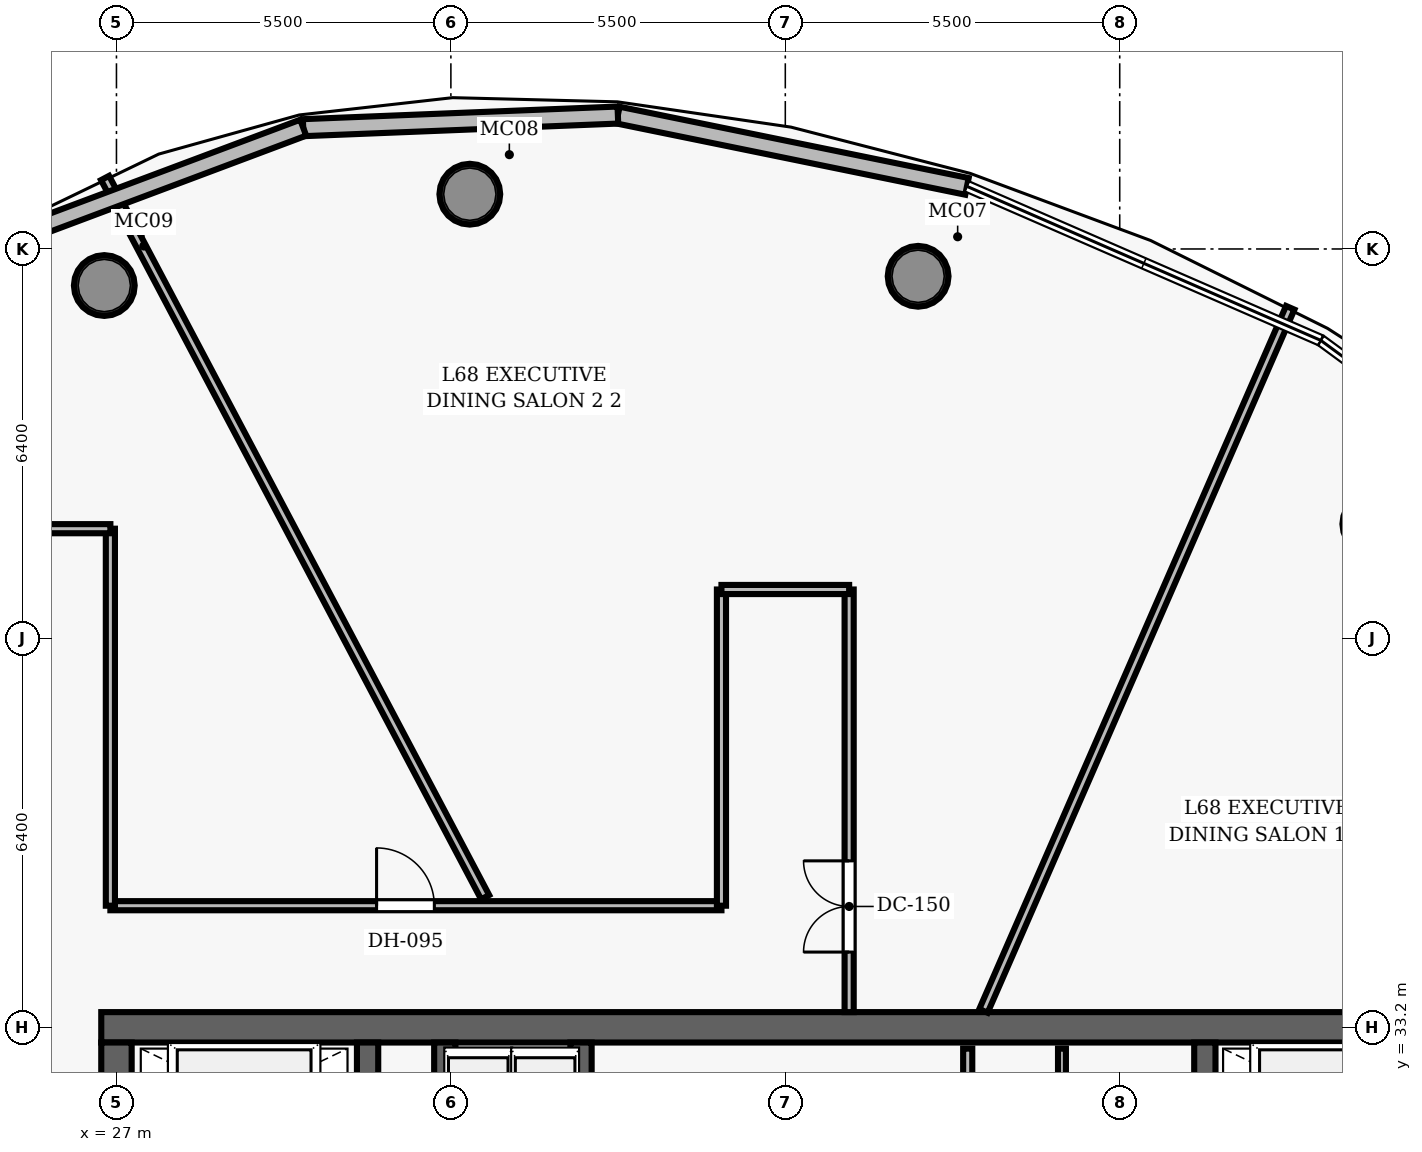
"""IFC4 building model, lengths in metres.
Left out: names, types, materials, properties, quantities, classifications, styles, units other than length and angle.
Written with IfcOpenShell. Run it as: python <this file> out.ifc"""

import sys

from ifc_helpers import new_model, si_unit, direction, frame, frame_2d, origin, origin_2d, place, context, subcontext, project, spatial, rectangle, hollow_circle, extrude, element, fill, save


model = new_model("IFC4")
c1 = context("Model", 3, precision=1e-05, world=origin(), true_north=direction((0.0, 1.0)))
c2 = subcontext(c1, "Body", "Model", "MODEL_VIEW")
j1 = project(units=[si_unit("LENGTHUNIT", "METRE"), si_unit("PLANEANGLEUNIT", "RADIAN")], contexts=[c1])
p1 = place(None, origin())
s1 = spatial("IfcSite", under=j1, at=p1, CompositionType="ELEMENT")
p2 = place(p1, origin())
s2 = spatial("IfcBuilding", under=s1, at=p2, CompositionType="ELEMENT")
p3 = place(p2, frame((0.0, 0.0, 269.0)))
s3 = spatial("IfcBuildingStorey", under=s2, at=p3, CompositionType="ELEMENT", Elevation=269.0)
p4 = place(p3, frame((26.75, 33.2, 0.0), z_axis=(0.0, 0.0, 1.0), x_axis=(1.0, 0.0, 0.0)))
e1 = element("IfcWall", 1, at=p4, inside=s3, PredefinedType="SHEAR", context=c2, shape_type="SweptSolid", body=[
    extrude(rectangle(XDim=22.5, YDim=0.5, at=frame_2d((11.25, 0.0))), origin(), (0.0, 0.0, 1.0), 3.85),
])
p5 = place(p3, frame((27.0, 19.05, 0.0), z_axis=(0.0, 0.0, 1.0), x_axis=(0.0, 1.0, 0.0)))
e2 = element("IfcWall", 2, at=p5, inside=s3, PredefinedType="SHEAR", context=c2, shape_type="SweptSolid", body=[
    extrude(rectangle(XDim=13.9, YDim=0.5, at=frame_2d((6.95, 0.0))), origin(), (0.0, 0.0, 1.0), 3.85),
])
p6 = place(p5, frame((8.2, 0.0, 0.0)))
e3 = element("IfcOpeningElement", 3, at=p6, cuts=e2, PredefinedType="OPENING", context=c2, shape_type="SweptSolid", body=[
    extrude(rectangle(XDim=1.05, YDim=2.15, at=frame_2d((0.525, 1.075))), frame((0.0, 0.26, 0.0), z_axis=(0.0, -1.0, 0.0), x_axis=(1.0, 0.0, 0.0)), (0.0, 0.0, 1.0), 0.52),
])
for number, where, z_axis, x_axis in (
    (4, (31.13, 19.05, 0.0), (0.0, 0.0, 1.0), (0.0, 1.0, 0.0)),
    (5, (44.9, 19.05, 0.0), (0.0, 0.0, 1.0), (0.0, 1.0, 0.0)),
):
    element("IfcWall", number, at=place(p3, frame(where, z_axis=z_axis, x_axis=x_axis)), inside=s3, PredefinedType="SHEAR", context=c2, shape_type="SweptSolid", body=[
        extrude(rectangle(XDim=13.9, YDim=0.35, at=frame_2d((6.95, 0.0))), origin(), (0.0, 0.0, 1.0), 3.85),
    ])
for number, where, z_axis, x_axis in (
    (6, (47.662, 41.477, 0.0), (0.0, 0.0, 1.0), (1.0, 0.0, 0.0)),
    (7, (40.185, 45.551, 0.0), (0.0, 0.0, 1.0), (1.0, 0.0, 0.0)),
    (8, (32.812, 46.901, 0.0), (0.0, 0.0, 1.0), (1.0, 0.0, 0.0)),
    (9, (26.8, 45.399, 0.0), (0.0, 0.0, 1.0), (1.0, 0.0, 0.0)),
):
    element("IfcColumn", number, at=place(p3, frame(where, z_axis=z_axis, x_axis=x_axis)), inside=s3, PredefinedType="COLUMN", context=c2, shape_type="SweptSolid", body=[
        extrude(hollow_circle(Radius=0.5, WallThickness=0.045, at=origin_2d()), origin(), (0.0, 0.0, 1.0), 3.85),
    ])
p7 = place(p3, frame((34.64, 26.69, 0.0), z_axis=(0.0, 0.0, 1.0), x_axis=(0.0, 1.0, 0.0)))
e10 = element("IfcWall", 10, at=p7, inside=s3, PredefinedType="SHEAR", context=c2, shape_type="SweptSolid", body=[
    extrude(rectangle(XDim=6.26, YDim=0.35, at=frame_2d((3.13, 0.0))), origin(), (0.0, 0.0, 1.0), 3.85),
])
p8 = place(p7, frame((0.85, 0.0, 0.0)))
e11 = element("IfcOpeningElement", 11, at=p8, cuts=e10, PredefinedType="OPENING", context=c2, shape_type="SweptSolid", body=[
    extrude(rectangle(XDim=1.05, YDim=2.15, at=frame_2d((0.525, 1.075))), frame((0.0, 0.185, 0.0), z_axis=(0.0, -1.0, 0.0), x_axis=(1.0, 0.0, 0.0)), (0.0, 0.0, 1.0), 0.37),
])
p9 = place(p3, frame((32.4, 30.22, 0.0), z_axis=(0.0, 0.0, 1.0), x_axis=(0.0, 1.0, 0.0)))
e12 = element("IfcWall", 12, at=p9, inside=s3, PredefinedType="SHEAR", context=c2, shape_type="SweptSolid", body=[
    extrude(rectangle(XDim=2.73, YDim=0.35, at=frame_2d((1.365, 0.0))), origin(), (0.0, 0.0, 1.0), 3.04),
])
p10 = place(p3, frame((41.0, 28.95, 0.0), z_axis=(0.0, 0.0, 1.0), x_axis=(0.0, 1.0, 0.0)))
e13 = element("IfcWall", 13, at=p10, inside=s3, PredefinedType="PARTITIONING", context=c2, shape_type="SweptSolid", body=[
    extrude(rectangle(XDim=3.9, YDim=0.15, at=frame_2d((1.95, 0.0))), origin(), (0.0, 0.0, 1.0), 3.04),
])
p11 = place(p10, frame((0.7, 0.0, 0.0)))
e14 = element("IfcOpeningElement", 14, at=p11, cuts=e13, PredefinedType="OPENING", context=c2, shape_type="SweptSolid", body=[
    extrude(rectangle(XDim=0.85, YDim=2.1, at=frame_2d((0.425, 1.05))), frame((0.0, 0.085, 0.0), z_axis=(0.0, -1.0, 0.0), x_axis=(1.0, 0.0, 0.0)), (0.0, 0.0, 1.0), 0.17),
])
p12 = place(p3, frame((42.55, 28.1, 0.0), z_axis=(0.0, 0.0, 1.0), x_axis=(0.0, 1.0, 0.0)))
e15 = element("IfcWall", 15, at=p12, inside=s3, PredefinedType="PARTITIONING", context=c2, shape_type="SweptSolid", body=[
    extrude(rectangle(XDim=4.75, YDim=0.13, at=frame_2d((2.375, 0.0))), origin(), (0.0, 0.0, 1.0), 3.04),
])
p13 = place(p12, frame((0.55, 0.0, 0.0)))
e16 = element("IfcOpeningElement", 16, at=p13, cuts=e15, PredefinedType="OPENING", context=c2, shape_type="SweptSolid", body=[
    extrude(rectangle(XDim=0.85, YDim=2.1, at=frame_2d((0.425, 1.05))), frame((0.0, 0.075, 0.0), z_axis=(0.0, -1.0, 0.0), x_axis=(1.0, 0.0, 0.0)), (0.0, 0.0, 1.0), 0.15),
])
p14 = place(p12, frame((2.9, 0.0, 0.0)))
e17 = element("IfcOpeningElement", 17, at=p14, cuts=e15, PredefinedType="OPENING", context=c2, shape_type="SweptSolid", body=[
    extrude(rectangle(XDim=0.85, YDim=2.1, at=frame_2d((0.425, 1.05))), frame((0.0, 0.075, 0.0), z_axis=(0.0, -1.0, 0.0), x_axis=(1.0, 0.0, 0.0)), (0.0, 0.0, 1.0), 0.15),
])
p15 = place(p3, frame((26.9, 35.2, 0.0), z_axis=(0.0, 0.0, 1.0), x_axis=(1.0, 0.0, 0.0)))
e18 = element("IfcWall", 18, at=p15, inside=s3, PredefinedType="PARTITIONING", context=c2, shape_type="SweptSolid", body=[
    extrude(rectangle(XDim=10.05, YDim=0.15, at=frame_2d((5.025, 0.0))), origin(), (0.0, 0.0, 1.0), 3.04),
])
p16 = place(p15, frame((4.378, 0.0, 0.0)))
e19 = element("IfcOpeningElement", 19, at=p16, cuts=e18, PredefinedType="OPENING", context=c2, shape_type="SweptSolid", body=[
    extrude(rectangle(XDim=0.95, YDim=2.15, at=frame_2d((0.475, 1.075))), frame((0.0, 0.085, 0.0), z_axis=(0.0, -1.0, 0.0), x_axis=(1.0, 0.0, 0.0)), (0.0, 0.0, 1.0), 0.17),
])
p17 = place(p3, frame((26.9, 35.2, 0.0), z_axis=(0.0, 0.0, 1.0), x_axis=(0.0, 1.0, 0.0)))
e20 = element("IfcWall", 20, at=p17, inside=s3, PredefinedType="PARTITIONING", context=c2, shape_type="SweptSolid", body=[
    extrude(rectangle(XDim=6.2, YDim=0.15, at=frame_2d((3.1, 0.0))), origin(), (0.0, 0.0, 1.0), 3.04),
])
p18 = place(p3, frame((24.8, 41.4, 0.0), z_axis=(0.0, 0.0, 1.0), x_axis=(1.0, 0.0, 0.0)))
e21 = element("IfcWall", 21, at=p18, inside=s3, PredefinedType="PARTITIONING", context=c2, shape_type="SweptSolid", body=[
    extrude(rectangle(XDim=2.1, YDim=0.15, at=frame_2d((1.05, 0.0))), origin(), (0.0, 0.0, 1.0), 3.04),
])
p19 = place(p3, frame((36.95, 35.2, 0.0), z_axis=(0.0, 0.0, 1.0), x_axis=(0.0, 1.0, 0.0)))
e22 = element("IfcWall", 22, at=p19, inside=s3, PredefinedType="PARTITIONING", context=c2, shape_type="SweptSolid", body=[
    extrude(rectangle(XDim=5.2, YDim=0.15, at=frame_2d((2.6, 0.0))), origin(), (0.0, 0.0, 1.0), 3.04),
])
p20 = place(p3, frame((39.05, 33.45, 0.0), z_axis=(0.0, 0.0, 1.0), x_axis=(0.0, 1.0, 0.0)))
e23 = element("IfcWall", 23, at=p20, inside=s3, PredefinedType="PARTITIONING", context=c2, shape_type="SweptSolid", body=[
    extrude(rectangle(XDim=6.95, YDim=0.15, at=frame_2d((3.475, 0.0))), origin(), (0.0, 0.0, 1.0), 3.04),
])
p21 = place(p20, frame((0.988, 0.0, 0.0)))
e24 = element("IfcOpeningElement", 24, at=p21, cuts=e23, PredefinedType="OPENING", context=c2, shape_type="SweptSolid", body=[
    extrude(rectangle(XDim=1.5, YDim=2.2, at=frame_2d((0.75, 1.1))), frame((0.0, 0.085, 0.0), z_axis=(0.0, -1.0, 0.0), x_axis=(1.0, 0.0, 0.0)), (0.0, 0.0, 1.0), 0.17),
])
p22 = place(p3, frame((36.95, 40.4, 0.0), z_axis=(0.0, 0.0, 1.0), x_axis=(1.0, 0.0, 0.0)))
e25 = element("IfcWall", 25, at=p22, inside=s3, PredefinedType="PARTITIONING", context=c2, shape_type="SweptSolid", body=[
    extrude(rectangle(XDim=2.1, YDim=0.15, at=frame_2d((1.05, 0.0))), origin(), (0.0, 0.0, 1.0), 3.04),
])
p23 = place(p3, frame((41.259, 33.47, 0.0), z_axis=(0.0, 0.0, 1.0), x_axis=(0.399896869604, 0.916560141879, 0.0)))
e26 = element("IfcWall", 26, at=p23, inside=s3, PredefinedType="PARTITIONING", context=c2, shape_type="SweptSolid", body=[
    extrude(rectangle(XDim=12.616, YDim=0.15, at=frame_2d((6.308, 0.0))), origin(), (0.0, 0.0, 1.0), 3.04),
])
p24 = place(p3, frame((33.064, 35.34, 0.0), z_axis=(0.0, 0.0, 1.0), x_axis=(-0.467283891031, 0.884107326733, 0.0)))
e27 = element("IfcWall", 27, at=p24, inside=s3, PredefinedType="PARTITIONING", context=c2, shape_type="SweptSolid", body=[
    extrude(rectangle(XDim=13.378, YDim=0.15, at=frame_2d((6.689, 0.0))), origin(), (0.0, 0.0, 1.0), 3.04),
])
p25 = place(p3, frame((35.246, 48.202, 0.0), z_axis=(0.0, 0.0, 1.0), x_axis=(0.979774562946, -0.200104487215, 0.0)))
e28 = element("IfcWall", 28, at=p25, inside=s3, PredefinedType="SOLIDWALL", context=c2, shape_type="SweptSolid", body=[
    extrude(rectangle(XDim=5.86, YDim=0.28, at=frame_2d((2.93, 0.0))), origin(), (0.0, 0.0, 1.0), 3.625),
])
p26 = place(p3, frame((30.071, 47.995, 0.0), z_axis=(0.0, 0.0, 1.0), x_axis=(0.999198848892, 0.04002074929, 0.0)))
e29 = element("IfcWall", 29, at=p26, inside=s3, PredefinedType="SOLIDWALL", context=c2, shape_type="SweptSolid", body=[
    extrude(rectangle(XDim=5.179, YDim=0.28, at=frame_2d((2.59, 0.0))), origin(), (0.0, 0.0, 1.0), 3.625),
])
p27 = place(p3, frame((25.717, 46.362, 0.0), z_axis=(0.0, 0.0, 1.0), x_axis=(0.936337806942, 0.351100429066, 0.0)))
e30 = element("IfcWall", 30, at=p27, inside=s3, PredefinedType="SOLIDWALL", context=c2, shape_type="SweptSolid", body=[
    extrude(rectangle(XDim=4.651, YDim=0.28, at=frame_2d((2.325, 0.0))), origin(), (0.0, 0.0, 1.0), 3.625),
])
p28 = place(p21, origin())
e31 = element("IfcDoor", 31, at=p28, inside=s3, OperationType="DOUBLE_DOOR_SINGLE_SWING", PredefinedType="DOOR", context=c2, shape_type="SweptSolid", body=[
    extrude(rectangle(XDim=1.5, YDim=2.2, at=frame_2d((0.75, 1.1))), frame((0.0, 0.025, 0.0), z_axis=(0.0, -1.0, 0.0), x_axis=(1.0, 0.0, 0.0)), (0.0, 0.0, 1.0), 0.05),
])
fill(e24, e31)
p29 = place(p16, origin())
e32 = element("IfcDoor", 32, at=p29, inside=s3, OperationType="SINGLE_SWING_LEFT", PredefinedType="DOOR", context=c2, shape_type="SweptSolid", body=[
    extrude(rectangle(XDim=0.95, YDim=2.15, at=frame_2d((0.475, 1.075))), frame((0.0, 0.025, 0.0), z_axis=(0.0, -1.0, 0.0), x_axis=(1.0, 0.0, 0.0)), (0.0, 0.0, 1.0), 0.05),
])
fill(e19, e32)
save(model, sys.argv[1])
